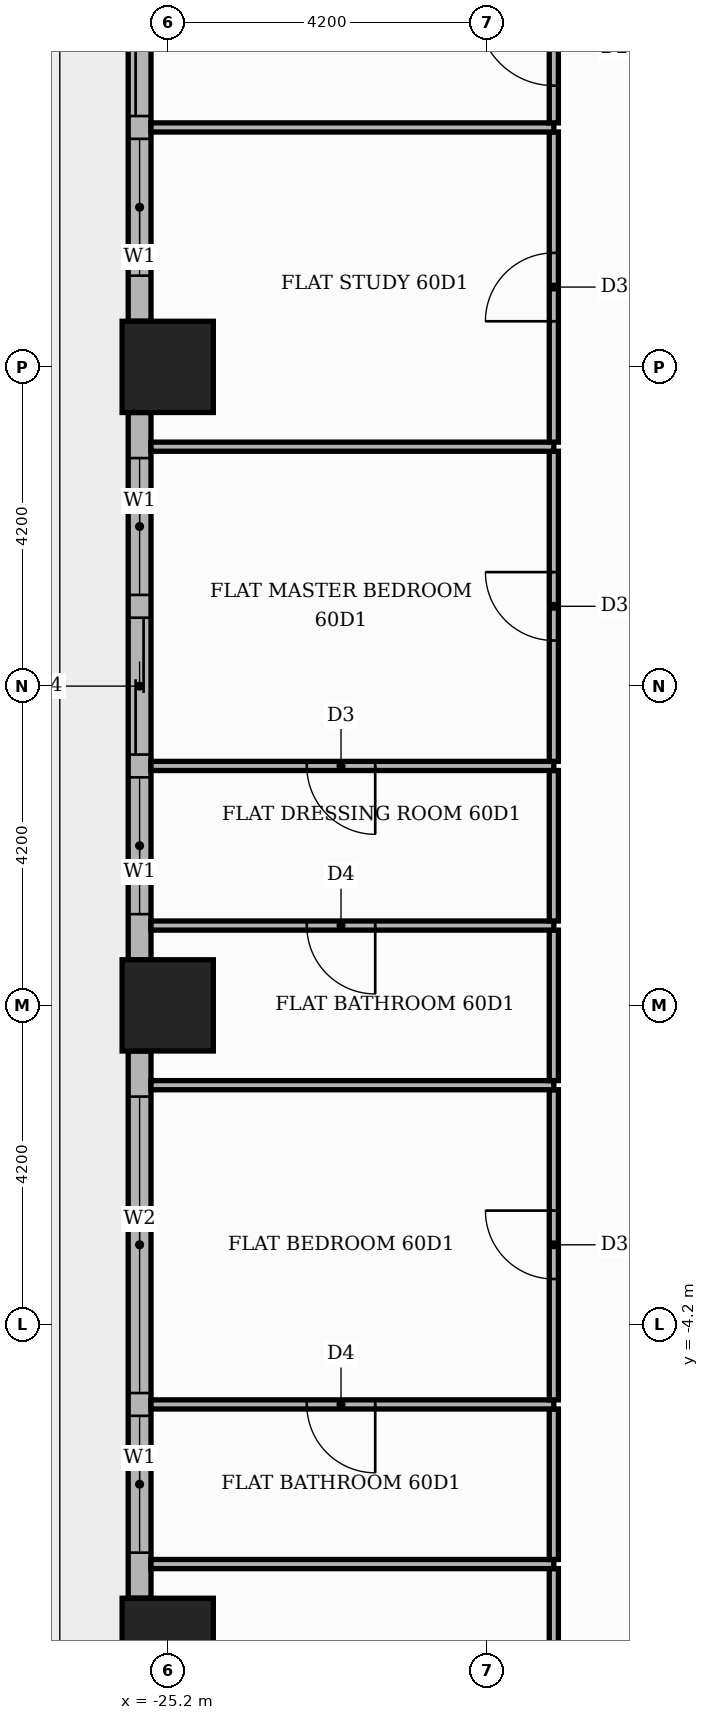
"""IFC4 building model, lengths in metres.
Left out: names, types, materials, properties, quantities, classifications, styles, units other than length and angle.
Written with IfcOpenShell. Run it as: python <this file> out.ifc"""

import sys

from ifc_helpers import new_model, si_unit, direction, frame, frame_2d, origin, origin_2d, place, context, subcontext, project, spatial, rectangle, extrude, element, fill, save


model = new_model("IFC4")
c1 = context("Model", 3, precision=1e-05, world=origin(), true_north=direction((0.0, 1.0)))
c2 = subcontext(c1, "Body", "Model", "MODEL_VIEW")
j1 = project(units=[si_unit("LENGTHUNIT", "METRE"), si_unit("PLANEANGLEUNIT", "RADIAN")], contexts=[c1])
p1 = place(None, origin())
s1 = spatial("IfcSite", under=j1, at=p1, CompositionType="ELEMENT")
p2 = place(p1, origin())
s2 = spatial("IfcBuilding", under=s1, at=p2, CompositionType="ELEMENT")
p3 = place(p2, frame((0.0, 0.0, 252.3)))
s3 = spatial("IfcBuildingStorey", under=s2, at=p3, CompositionType="ELEMENT", Elevation=252.3)
for number, where, z_axis, x_axis in (
    (1, (-25.2, 0.0, 0.0), (0.0, 0.0, 1.0), (1.0, 0.0, 0.0)),
    (2, (-25.2, -8.4, 0.0), (0.0, 0.0, 1.0), (1.0, 0.0, 0.0)),
    (3, (-25.2, 8.4, 0.0), (0.0, 0.0, 1.0), (1.0, 0.0, 0.0)),
):
    element("IfcColumn", number, at=place(p3, frame(where, z_axis=z_axis, x_axis=x_axis)), inside=s3, PredefinedType="COLUMN", context=c2, shape_type="SweptSolid", body=[
        extrude(rectangle(XDim=1.2, YDim=1.2, at=origin_2d()), origin(), (0.0, 0.0, 1.0), 3.9),
    ])
p4 = place(p3, frame((-25.57, 16.2, 0.0), z_axis=(0.0, 0.0, 1.0), x_axis=(0.0, -1.0, 0.0)))
e4 = element("IfcWall", 4, at=p4, inside=s3, PredefinedType="STANDARD", context=c2, shape_type="SweptSolid", body=[
    extrude(rectangle(XDim=7.2, YDim=0.3, at=frame_2d((3.6, 0.0))), origin(), (0.0, 0.0, 1.0), 3.48),
])
p5 = place(p4, frame((0.6, 0.0, 0.0)))
e5 = element("IfcOpeningElement", 5, at=p5, cuts=e4, PredefinedType="OPENING", context=c2, shape_type="SweptSolid", body=[
    extrude(rectangle(XDim=3.9, YDim=2.4, at=frame_2d((1.95, 1.2))), frame((0.0, 0.16, 0.0), z_axis=(0.0, -1.0, 0.0), x_axis=(1.0, 0.0, 0.0)), (0.0, 0.0, 1.0), 0.32),
])
p6 = place(p4, frame((4.8, 0.0, 0.9)))
e6 = element("IfcOpeningElement", 6, at=p6, cuts=e4, PredefinedType="OPENING", context=c2, shape_type="SweptSolid", body=[
    extrude(rectangle(XDim=1.8, YDim=2.1, at=frame_2d((0.9, 1.05))), frame((0.0, 0.16, 0.0), z_axis=(0.0, -1.0, 0.0), x_axis=(1.0, 0.0, 0.0)), (0.0, 0.0, 1.0), 0.32),
])
p7 = place(p3, frame((-25.57, 7.8, 0.0), z_axis=(0.0, 0.0, 1.0), x_axis=(0.0, -1.0, 0.0)))
e7 = element("IfcWall", 7, at=p7, inside=s3, PredefinedType="STANDARD", context=c2, shape_type="SweptSolid", body=[
    extrude(rectangle(XDim=7.2, YDim=0.3, at=frame_2d((3.6, 0.0))), origin(), (0.0, 0.0, 1.0), 3.48),
])
p8 = place(p7, frame((0.6, 0.0, 0.9)))
e8 = element("IfcOpeningElement", 8, at=p8, cuts=e7, PredefinedType="OPENING", context=c2, shape_type="SweptSolid", body=[
    extrude(rectangle(XDim=1.8, YDim=2.1, at=frame_2d((0.9, 1.05))), frame((0.0, 0.16, 0.0), z_axis=(0.0, -1.0, 0.0), x_axis=(1.0, 0.0, 0.0)), (0.0, 0.0, 1.0), 0.32),
])
p9 = place(p7, frame((2.7, 0.0, 0.0)))
e9 = element("IfcOpeningElement", 9, at=p9, cuts=e7, PredefinedType="OPENING", context=c2, shape_type="SweptSolid", body=[
    extrude(rectangle(XDim=1.8, YDim=2.4, at=frame_2d((0.9, 1.2))), frame((0.0, 0.16, 0.0), z_axis=(0.0, -1.0, 0.0), x_axis=(1.0, 0.0, 0.0)), (0.0, 0.0, 1.0), 0.32),
])
p10 = place(p7, frame((4.8, 0.0, 0.9)))
e10 = element("IfcOpeningElement", 10, at=p10, cuts=e7, PredefinedType="OPENING", context=c2, shape_type="SweptSolid", body=[
    extrude(rectangle(XDim=1.8, YDim=2.1, at=frame_2d((0.9, 1.05))), frame((0.0, 0.16, 0.0), z_axis=(0.0, -1.0, 0.0), x_axis=(1.0, 0.0, 0.0)), (0.0, 0.0, 1.0), 0.32),
])
p11 = place(p3, frame((-25.57, -0.6, 0.0), z_axis=(0.0, 0.0, 1.0), x_axis=(0.0, -1.0, 0.0)))
e11 = element("IfcWall", 11, at=p11, inside=s3, PredefinedType="STANDARD", context=c2, shape_type="SweptSolid", body=[
    extrude(rectangle(XDim=7.2, YDim=0.3, at=frame_2d((3.6, 0.0))), origin(), (0.0, 0.0, 1.0), 3.48),
])
p12 = place(p11, frame((0.6, 0.0, 0.9)))
e12 = element("IfcOpeningElement", 12, at=p12, cuts=e11, PredefinedType="OPENING", context=c2, shape_type="SweptSolid", body=[
    extrude(rectangle(XDim=3.9, YDim=2.1, at=frame_2d((1.95, 1.05))), frame((0.0, 0.16, 0.0), z_axis=(0.0, -1.0, 0.0), x_axis=(1.0, 0.0, 0.0)), (0.0, 0.0, 1.0), 0.32),
])
p13 = place(p11, frame((4.8, 0.0, 0.9)))
e13 = element("IfcOpeningElement", 13, at=p13, cuts=e11, PredefinedType="OPENING", context=c2, shape_type="SweptSolid", body=[
    extrude(rectangle(XDim=1.8, YDim=2.1, at=frame_2d((0.9, 1.05))), frame((0.0, 0.16, 0.0), z_axis=(0.0, -1.0, 0.0), x_axis=(1.0, 0.0, 0.0)), (0.0, 0.0, 1.0), 0.32),
])
p14 = place(p3, frame((-20.12, -11.49, 0.0), z_axis=(0.0, 0.0, 1.0), x_axis=(0.0, 1.0, 0.0)))
e14 = element("IfcWall", 14, at=p14, inside=s3, PredefinedType="PARTITIONING", context=c2, shape_type="SweptSolid", body=[
    extrude(rectangle(XDim=4.08, YDim=0.12, at=frame_2d((2.04, 0.0))), origin(), (0.0, 0.0, 1.0), 3.48),
])
p15 = place(p14, frame((1.59, 0.0, 0.0)))
e15 = element("IfcOpeningElement", 15, at=p15, cuts=e14, PredefinedType="OPENING", context=c2, shape_type="SweptSolid", body=[
    extrude(rectangle(XDim=0.9, YDim=2.1, at=frame_2d((0.45, 1.05))), frame((0.0, 0.07, 0.0), z_axis=(0.0, -1.0, 0.0), x_axis=(1.0, 0.0, 0.0)), (0.0, 0.0, 1.0), 0.14),
])
p16 = place(p3, frame((-25.42, -7.35, 0.0), z_axis=(0.0, 0.0, 1.0), x_axis=(1.0, 0.0, 0.0)))
e16 = element("IfcWall", 16, at=p16, inside=s3, PredefinedType="PARTITIONING", context=c2, shape_type="SweptSolid", body=[
    extrude(rectangle(XDim=5.3, YDim=0.12, at=frame_2d((2.65, 0.0))), origin(), (0.0, 0.0, 1.0), 3.48),
])
p17 = place(p3, frame((-20.12, -7.29, 0.0), z_axis=(0.0, 0.0, 1.0), x_axis=(0.0, 1.0, 0.0)))
e17 = element("IfcWall", 17, at=p17, inside=s3, PredefinedType="PARTITIONING", context=c2, shape_type="SweptSolid", body=[
    extrude(rectangle(XDim=1.98, YDim=0.12, at=frame_2d((0.99, 0.0))), origin(), (0.0, 0.0, 1.0), 3.48),
])
p18 = place(p3, frame((-25.42, -5.25, 0.0), z_axis=(0.0, 0.0, 1.0), x_axis=(1.0, 0.0, 0.0)))
e18 = element("IfcWall", 18, at=p18, inside=s3, PredefinedType="PARTITIONING", context=c2, shape_type="SweptSolid", body=[
    extrude(rectangle(XDim=5.3, YDim=0.12, at=frame_2d((2.65, 0.0))), origin(), (0.0, 0.0, 1.0), 3.48),
])
p19 = place(p18, frame((2.05, 0.0, 0.0)))
e19 = element("IfcOpeningElement", 19, at=p19, cuts=e18, PredefinedType="OPENING", context=c2, shape_type="SweptSolid", body=[
    extrude(rectangle(XDim=0.9, YDim=2.1, at=frame_2d((0.45, 1.05))), frame((0.0, 0.07, 0.0), z_axis=(0.0, -1.0, 0.0), x_axis=(1.0, 0.0, 0.0)), (0.0, 0.0, 1.0), 0.14),
])
p20 = place(p3, frame((-20.12, -5.19, 0.0), z_axis=(0.0, 0.0, 1.0), x_axis=(0.0, 1.0, 0.0)))
e20 = element("IfcWall", 20, at=p20, inside=s3, PredefinedType="PARTITIONING", context=c2, shape_type="SweptSolid", body=[
    extrude(rectangle(XDim=4.08, YDim=0.12, at=frame_2d((2.04, 0.0))), origin(), (0.0, 0.0, 1.0), 3.48),
])
p21 = place(p20, frame((1.59, 0.0, 0.0)))
e21 = element("IfcOpeningElement", 21, at=p21, cuts=e20, PredefinedType="OPENING", context=c2, shape_type="SweptSolid", body=[
    extrude(rectangle(XDim=0.9, YDim=2.1, at=frame_2d((0.45, 1.05))), frame((0.0, 0.07, 0.0), z_axis=(0.0, -1.0, 0.0), x_axis=(1.0, 0.0, 0.0)), (0.0, 0.0, 1.0), 0.14),
])
p22 = place(p3, frame((-25.42, -1.05, 0.0), z_axis=(0.0, 0.0, 1.0), x_axis=(1.0, 0.0, 0.0)))
e22 = element("IfcWall", 22, at=p22, inside=s3, PredefinedType="PARTITIONING", context=c2, shape_type="SweptSolid", body=[
    extrude(rectangle(XDim=5.3, YDim=0.12, at=frame_2d((2.65, 0.0))), origin(), (0.0, 0.0, 1.0), 3.48),
])
p23 = place(p3, frame((-20.12, -0.99, 0.0), z_axis=(0.0, 0.0, 1.0), x_axis=(0.0, 1.0, 0.0)))
e23 = element("IfcWall", 23, at=p23, inside=s3, PredefinedType="PARTITIONING", context=c2, shape_type="SweptSolid", body=[
    extrude(rectangle(XDim=1.98, YDim=0.12, at=frame_2d((0.99, 0.0))), origin(), (0.0, 0.0, 1.0), 3.48),
])
p24 = place(p3, frame((-25.42, 1.05, 0.0), z_axis=(0.0, 0.0, 1.0), x_axis=(1.0, 0.0, 0.0)))
e24 = element("IfcWall", 24, at=p24, inside=s3, PredefinedType="PARTITIONING", context=c2, shape_type="SweptSolid", body=[
    extrude(rectangle(XDim=5.3, YDim=0.12, at=frame_2d((2.65, 0.0))), origin(), (0.0, 0.0, 1.0), 3.48),
])
p25 = place(p24, frame((2.05, 0.0, 0.0)))
e25 = element("IfcOpeningElement", 25, at=p25, cuts=e24, PredefinedType="OPENING", context=c2, shape_type="SweptSolid", body=[
    extrude(rectangle(XDim=0.9, YDim=2.1, at=frame_2d((0.45, 1.05))), frame((0.0, 0.07, 0.0), z_axis=(0.0, -1.0, 0.0), x_axis=(1.0, 0.0, 0.0)), (0.0, 0.0, 1.0), 0.14),
])
p26 = place(p3, frame((-20.12, 1.11, 0.0), z_axis=(0.0, 0.0, 1.0), x_axis=(0.0, 1.0, 0.0)))
e26 = element("IfcWall", 26, at=p26, inside=s3, PredefinedType="PARTITIONING", context=c2, shape_type="SweptSolid", body=[
    extrude(rectangle(XDim=1.98, YDim=0.12, at=frame_2d((0.99, 0.0))), origin(), (0.0, 0.0, 1.0), 3.48),
])
p27 = place(p3, frame((-25.42, 3.15, 0.0), z_axis=(0.0, 0.0, 1.0), x_axis=(1.0, 0.0, 0.0)))
e27 = element("IfcWall", 27, at=p27, inside=s3, PredefinedType="PARTITIONING", context=c2, shape_type="SweptSolid", body=[
    extrude(rectangle(XDim=5.3, YDim=0.12, at=frame_2d((2.65, 0.0))), origin(), (0.0, 0.0, 1.0), 3.48),
])
p28 = place(p27, frame((2.05, 0.0, 0.0)))
e28 = element("IfcOpeningElement", 28, at=p28, cuts=e27, PredefinedType="OPENING", context=c2, shape_type="SweptSolid", body=[
    extrude(rectangle(XDim=0.9, YDim=2.1, at=frame_2d((0.45, 1.05))), frame((0.0, 0.07, 0.0), z_axis=(0.0, -1.0, 0.0), x_axis=(1.0, 0.0, 0.0)), (0.0, 0.0, 1.0), 0.14),
])
p29 = place(p3, frame((-20.12, 3.21, 0.0), z_axis=(0.0, 0.0, 1.0), x_axis=(0.0, 1.0, 0.0)))
e29 = element("IfcWall", 29, at=p29, inside=s3, PredefinedType="PARTITIONING", context=c2, shape_type="SweptSolid", body=[
    extrude(rectangle(XDim=4.08, YDim=0.12, at=frame_2d((2.04, 0.0))), origin(), (0.0, 0.0, 1.0), 3.48),
])
p30 = place(p29, frame((1.59, 0.0, 0.0)))
e30 = element("IfcOpeningElement", 30, at=p30, cuts=e29, PredefinedType="OPENING", context=c2, shape_type="SweptSolid", body=[
    extrude(rectangle(XDim=0.9, YDim=2.1, at=frame_2d((0.45, 1.05))), frame((0.0, 0.07, 0.0), z_axis=(0.0, -1.0, 0.0), x_axis=(1.0, 0.0, 0.0)), (0.0, 0.0, 1.0), 0.14),
])
p31 = place(p3, frame((-25.42, 7.35, 0.0), z_axis=(0.0, 0.0, 1.0), x_axis=(1.0, 0.0, 0.0)))
e31 = element("IfcWall", 31, at=p31, inside=s3, PredefinedType="PARTITIONING", context=c2, shape_type="SweptSolid", body=[
    extrude(rectangle(XDim=5.3, YDim=0.12, at=frame_2d((2.65, 0.0))), origin(), (0.0, 0.0, 1.0), 3.48),
])
p32 = place(p3, frame((-20.12, 7.41, 0.0), z_axis=(0.0, 0.0, 1.0), x_axis=(0.0, 1.0, 0.0)))
e32 = element("IfcWall", 32, at=p32, inside=s3, PredefinedType="PARTITIONING", context=c2, shape_type="SweptSolid", body=[
    extrude(rectangle(XDim=4.08, YDim=0.12, at=frame_2d((2.04, 0.0))), origin(), (0.0, 0.0, 1.0), 3.48),
])
p33 = place(p32, frame((1.59, 0.0, 0.0)))
e33 = element("IfcOpeningElement", 33, at=p33, cuts=e32, PredefinedType="OPENING", context=c2, shape_type="SweptSolid", body=[
    extrude(rectangle(XDim=0.9, YDim=2.1, at=frame_2d((0.45, 1.05))), frame((0.0, 0.07, 0.0), z_axis=(0.0, -1.0, 0.0), x_axis=(1.0, 0.0, 0.0)), (0.0, 0.0, 1.0), 0.14),
])
p34 = place(p3, frame((-25.42, 11.55, 0.0), z_axis=(0.0, 0.0, 1.0), x_axis=(1.0, 0.0, 0.0)))
e34 = element("IfcWall", 34, at=p34, inside=s3, PredefinedType="PARTITIONING", context=c2, shape_type="SweptSolid", body=[
    extrude(rectangle(XDim=5.3, YDim=0.12, at=frame_2d((2.65, 0.0))), origin(), (0.0, 0.0, 1.0), 3.48),
])
p35 = place(p3, frame((-20.12, 11.61, 0.0), z_axis=(0.0, 0.0, 1.0), x_axis=(0.0, 1.0, 0.0)))
e35 = element("IfcWall", 35, at=p35, inside=s3, PredefinedType="PARTITIONING", context=c2, shape_type="SweptSolid", body=[
    extrude(rectangle(XDim=1.98, YDim=0.12, at=frame_2d((0.99, 0.0))), origin(), (0.0, 0.0, 1.0), 3.48),
])
p36 = place(p35, frame((0.49, 0.0, 0.0)))
e36 = element("IfcOpeningElement", 36, at=p36, cuts=e35, PredefinedType="OPENING", context=c2, shape_type="SweptSolid", body=[
    extrude(rectangle(XDim=1.0, YDim=2.1, at=frame_2d((0.5, 1.05))), frame((0.0, 0.07, 0.0), z_axis=(0.0, -1.0, 0.0), x_axis=(1.0, 0.0, 0.0)), (0.0, 0.0, 1.0), 0.14),
])
p37 = place(p5, origin())
e37 = element("IfcDoor", 37, at=p37, inside=s3, OperationType="SLIDING_TO_LEFT", PredefinedType="DOOR", context=c2, shape_type="SweptSolid", body=[
    extrude(rectangle(XDim=3.9, YDim=2.4, at=frame_2d((1.95, 1.2))), frame((0.0, 0.025, 0.0), z_axis=(0.0, -1.0, 0.0), x_axis=(1.0, 0.0, 0.0)), (0.0, 0.0, 1.0), 0.05),
])
fill(e5, e37)
p38 = place(p6, origin())
e38 = element("IfcWindow", 38, at=p38, inside=s3, PartitioningType="SINGLE_PANEL", PredefinedType="WINDOW", context=c2, shape_type="SweptSolid", body=[
    extrude(rectangle(XDim=1.8, YDim=2.1, at=frame_2d((0.9, 1.05))), frame((0.0, 0.03, 0.0), z_axis=(0.0, -1.0, 0.0), x_axis=(1.0, 0.0, 0.0)), (0.0, 0.0, 1.0), 0.06),
])
fill(e6, e38)
p39 = place(p8, origin())
e39 = element("IfcWindow", 39, at=p39, inside=s3, PartitioningType="SINGLE_PANEL", PredefinedType="WINDOW", context=c2, shape_type="SweptSolid", body=[
    extrude(rectangle(XDim=1.8, YDim=2.1, at=frame_2d((0.9, 1.05))), frame((0.0, 0.03, 0.0), z_axis=(0.0, -1.0, 0.0), x_axis=(1.0, 0.0, 0.0)), (0.0, 0.0, 1.0), 0.06),
])
fill(e8, e39)
p40 = place(p9, origin())
e40 = element("IfcDoor", 40, at=p40, inside=s3, OperationType="SLIDING_TO_LEFT", PredefinedType="DOOR", context=c2, shape_type="SweptSolid", body=[
    extrude(rectangle(XDim=1.8, YDim=2.4, at=frame_2d((0.9, 1.2))), frame((0.0, 0.025, 0.0), z_axis=(0.0, -1.0, 0.0), x_axis=(1.0, 0.0, 0.0)), (0.0, 0.0, 1.0), 0.05),
])
fill(e9, e40)
p41 = place(p10, origin())
e41 = element("IfcWindow", 41, at=p41, inside=s3, PartitioningType="SINGLE_PANEL", PredefinedType="WINDOW", context=c2, shape_type="SweptSolid", body=[
    extrude(rectangle(XDim=1.8, YDim=2.1, at=frame_2d((0.9, 1.05))), frame((0.0, 0.03, 0.0), z_axis=(0.0, -1.0, 0.0), x_axis=(1.0, 0.0, 0.0)), (0.0, 0.0, 1.0), 0.06),
])
fill(e10, e41)
p42 = place(p12, origin())
e42 = element("IfcWindow", 42, at=p42, inside=s3, PartitioningType="SINGLE_PANEL", PredefinedType="WINDOW", context=c2, shape_type="SweptSolid", body=[
    extrude(rectangle(XDim=3.9, YDim=2.1, at=frame_2d((1.95, 1.05))), frame((0.0, 0.03, 0.0), z_axis=(0.0, -1.0, 0.0), x_axis=(1.0, 0.0, 0.0)), (0.0, 0.0, 1.0), 0.06),
])
fill(e12, e42)
p43 = place(p13, origin())
e43 = element("IfcWindow", 43, at=p43, inside=s3, PartitioningType="SINGLE_PANEL", PredefinedType="WINDOW", context=c2, shape_type="SweptSolid", body=[
    extrude(rectangle(XDim=1.8, YDim=2.1, at=frame_2d((0.9, 1.05))), frame((0.0, 0.03, 0.0), z_axis=(0.0, -1.0, 0.0), x_axis=(1.0, 0.0, 0.0)), (0.0, 0.0, 1.0), 0.06),
])
fill(e13, e43)
p44 = place(p36, origin())
e44 = element("IfcDoor", 44, at=p44, inside=s3, OperationType="SINGLE_SWING_RIGHT", PredefinedType="DOOR", context=c2, shape_type="SweptSolid", body=[
    extrude(rectangle(XDim=1.0, YDim=2.1, at=frame_2d((0.5, 1.05))), frame((0.0, 0.025, 0.0), z_axis=(0.0, -1.0, 0.0), x_axis=(1.0, 0.0, 0.0)), (0.0, 0.0, 1.0), 0.05),
])
fill(e36, e44)
p45 = place(p33, origin())
e45 = element("IfcDoor", 45, at=p45, inside=s3, OperationType="SINGLE_SWING_LEFT", PredefinedType="DOOR", context=c2, shape_type="SweptSolid", body=[
    extrude(rectangle(XDim=0.9, YDim=2.1, at=frame_2d((0.45, 1.05))), frame((0.0, 0.025, 0.0), z_axis=(0.0, -1.0, 0.0), x_axis=(1.0, 0.0, 0.0)), (0.0, 0.0, 1.0), 0.05),
])
fill(e33, e45)
p46 = place(p30, origin())
e46 = element("IfcDoor", 46, at=p46, inside=s3, OperationType="SINGLE_SWING_RIGHT", PredefinedType="DOOR", context=c2, shape_type="SweptSolid", body=[
    extrude(rectangle(XDim=0.9, YDim=2.1, at=frame_2d((0.45, 1.05))), frame((0.0, 0.025, 0.0), z_axis=(0.0, -1.0, 0.0), x_axis=(1.0, 0.0, 0.0)), (0.0, 0.0, 1.0), 0.05),
])
fill(e30, e46)
p47 = place(p28, frame((0.9, 0.0, 0.0), z_axis=(0.0, 0.0, 1.0), x_axis=(-1.0, 0.0, 0.0)))
e47 = element("IfcDoor", 47, at=p47, inside=s3, OperationType="SINGLE_SWING_RIGHT", PredefinedType="DOOR", context=c2, shape_type="SweptSolid", body=[
    extrude(rectangle(XDim=0.9, YDim=2.1, at=frame_2d((0.45, 1.05))), frame((0.0, 0.025, 0.0), z_axis=(0.0, -1.0, 0.0), x_axis=(1.0, 0.0, 0.0)), (0.0, 0.0, 1.0), 0.05),
])
fill(e28, e47)
p48 = place(p25, frame((0.9, 0.0, 0.0), z_axis=(0.0, 0.0, 1.0), x_axis=(-1.0, 0.0, 0.0)))
e48 = element("IfcDoor", 48, at=p48, inside=s3, OperationType="SINGLE_SWING_RIGHT", PredefinedType="DOOR", context=c2, shape_type="SweptSolid", body=[
    extrude(rectangle(XDim=0.9, YDim=2.1, at=frame_2d((0.45, 1.05))), frame((0.0, 0.025, 0.0), z_axis=(0.0, -1.0, 0.0), x_axis=(1.0, 0.0, 0.0)), (0.0, 0.0, 1.0), 0.05),
])
fill(e25, e48)
p49 = place(p21, origin())
e49 = element("IfcDoor", 49, at=p49, inside=s3, OperationType="SINGLE_SWING_RIGHT", PredefinedType="DOOR", context=c2, shape_type="SweptSolid", body=[
    extrude(rectangle(XDim=0.9, YDim=2.1, at=frame_2d((0.45, 1.05))), frame((0.0, 0.025, 0.0), z_axis=(0.0, -1.0, 0.0), x_axis=(1.0, 0.0, 0.0)), (0.0, 0.0, 1.0), 0.05),
])
fill(e21, e49)
p50 = place(p19, frame((0.9, 0.0, 0.0), z_axis=(0.0, 0.0, 1.0), x_axis=(-1.0, 0.0, 0.0)))
e50 = element("IfcDoor", 50, at=p50, inside=s3, OperationType="SINGLE_SWING_RIGHT", PredefinedType="DOOR", context=c2, shape_type="SweptSolid", body=[
    extrude(rectangle(XDim=0.9, YDim=2.1, at=frame_2d((0.45, 1.05))), frame((0.0, 0.025, 0.0), z_axis=(0.0, -1.0, 0.0), x_axis=(1.0, 0.0, 0.0)), (0.0, 0.0, 1.0), 0.05),
])
fill(e19, e50)
save(model, sys.argv[1])
